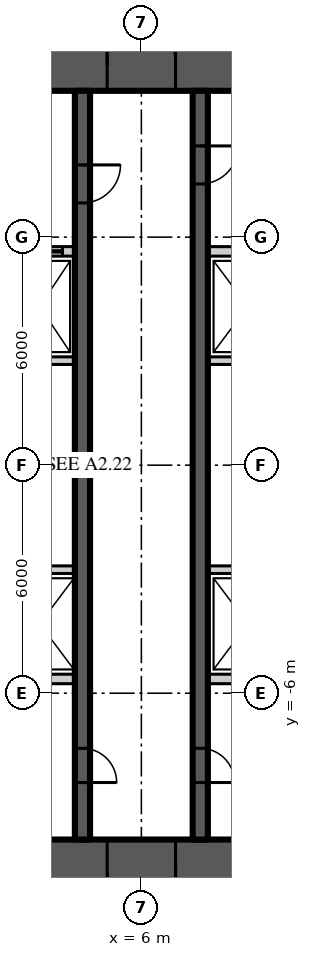
"""IFC4 building model, lengths in metres.
Left out: names, types, materials, properties, quantities, classifications, styles, units other than length and angle.
Written with IfcOpenShell. Run it as: python <this file> out.ifc"""

import sys

from ifc_helpers import new_model, si_unit, direction, frame, frame_2d, origin, place, context, subcontext, project, spatial, rectangle, extrude, element, fill, save


model = new_model("IFC4")
c1 = context("Model", 3, precision=1e-05, world=origin(), true_north=direction((0.0, 1.0)))
c2 = subcontext(c1, "Body", "Model", "MODEL_VIEW")
j1 = project(units=[si_unit("LENGTHUNIT", "METRE"), si_unit("PLANEANGLEUNIT", "RADIAN")], contexts=[c1])
p1 = place(None, origin())
s1 = spatial("IfcSite", under=j1, at=p1, CompositionType="ELEMENT")
p2 = place(p1, origin())
s2 = spatial("IfcBuilding", under=s1, at=p2, CompositionType="ELEMENT")
p3 = place(p2, frame((0.0, 0.0, 163.2)))
s3 = spatial("IfcBuildingStorey", under=s2, at=p3, CompositionType="ELEMENT", Elevation=163.2)
p4 = place(p3, frame((-11.15, 10.5, 0.0), z_axis=(0.0, 0.0, 1.0), x_axis=(1.0, 0.0, 0.0)))
e1 = element("IfcWall", 1, at=p4, inside=s3, PredefinedType="SHEAR", context=c2, shape_type="SweptSolid", body=[
    extrude(rectangle(XDim=22.3, YDim=1.3, at=frame_2d((11.15, 0.0))), origin(), (0.0, 0.0, 1.0), 3.9),
])
p5 = place(p4, frame((4.25, 0.0, 0.0)))
e2 = element("IfcOpeningElement", 2, at=p5, cuts=e1, PredefinedType="OPENING", context=c2, shape_type="SweptSolid", body=[
    extrude(rectangle(XDim=1.8, YDim=2.2, at=frame_2d((0.9, 1.1))), frame((0.0, 0.66, 0.0), z_axis=(0.0, -1.0, 0.0), x_axis=(1.0, 0.0, 0.0)), (0.0, 0.0, 1.0), 1.32),
])
p6 = place(p4, frame((16.25, 0.0, 0.0)))
e3 = element("IfcOpeningElement", 3, at=p6, cuts=e1, PredefinedType="OPENING", context=c2, shape_type="SweptSolid", body=[
    extrude(rectangle(XDim=1.8, YDim=2.2, at=frame_2d((0.9, 1.1))), frame((0.0, 0.66, 0.0), z_axis=(0.0, -1.0, 0.0), x_axis=(1.0, 0.0, 0.0)), (0.0, 0.0, 1.0), 1.32),
])
p7 = place(p3, frame((11.15, -10.5, 0.0), z_axis=(0.0, 0.0, 1.0), x_axis=(-1.0, 0.0, 0.0)))
e4 = element("IfcWall", 4, at=p7, inside=s3, PredefinedType="SHEAR", context=c2, shape_type="SweptSolid", body=[
    extrude(rectangle(XDim=22.3, YDim=1.3, at=frame_2d((11.15, 0.0))), origin(), (0.0, 0.0, 1.0), 3.9),
])
p8 = place(p7, frame((16.25, 0.0, 0.0)))
e5 = element("IfcOpeningElement", 5, at=p8, cuts=e4, PredefinedType="OPENING", context=c2, shape_type="SweptSolid", body=[
    extrude(rectangle(XDim=1.8, YDim=2.2, at=frame_2d((0.9, 1.1))), frame((0.0, 0.66, 0.0), z_axis=(0.0, -1.0, 0.0), x_axis=(1.0, 0.0, 0.0)), (0.0, 0.0, 1.0), 1.32),
])
p9 = place(p7, frame((4.25, 0.0, 0.0)))
e6 = element("IfcOpeningElement", 6, at=p9, cuts=e4, PredefinedType="OPENING", context=c2, shape_type="SweptSolid", body=[
    extrude(rectangle(XDim=1.8, YDim=2.2, at=frame_2d((0.9, 1.1))), frame((0.0, 0.66, 0.0), z_axis=(0.0, -1.0, 0.0), x_axis=(1.0, 0.0, 0.0)), (0.0, 0.0, 1.0), 1.32),
])
p10 = place(p3, frame((7.55, 9.85, 0.0), z_axis=(0.0, 0.0, 1.0), x_axis=(0.0, -1.0, 0.0)))
e7 = element("IfcWall", 7, at=p10, inside=s3, PredefinedType="SHEAR", context=c2, shape_type="SweptSolid", body=[
    extrude(rectangle(XDim=19.7, YDim=0.4, at=frame_2d((9.85, 0.0))), origin(), (0.0, 0.0, 1.0), 3.9),
])
p11 = place(p10, frame((1.45, 0.0, 0.0)))
e8 = element("IfcOpeningElement", 8, at=p11, cuts=e7, PredefinedType="OPENING", context=c2, shape_type="SweptSolid", body=[
    extrude(rectangle(XDim=1.0, YDim=2.2, at=frame_2d((0.5, 1.1))), frame((0.0, 0.21, 0.0), z_axis=(0.0, -1.0, 0.0), x_axis=(1.0, 0.0, 0.0)), (0.0, 0.0, 1.0), 0.42),
])
p12 = place(p10, frame((17.3, 0.0, 0.0)))
e9 = element("IfcOpeningElement", 9, at=p12, cuts=e7, PredefinedType="OPENING", context=c2, shape_type="SweptSolid", body=[
    extrude(rectangle(XDim=0.9, YDim=2.1, at=frame_2d((0.45, 1.05))), frame((0.0, 0.21, 0.0), z_axis=(0.0, -1.0, 0.0), x_axis=(1.0, 0.0, 0.0)), (0.0, 0.0, 1.0), 0.42),
])
p13 = place(p3, frame((4.45, 9.85, 0.0), z_axis=(0.0, 0.0, 1.0), x_axis=(0.0, -1.0, 0.0)))
e10 = element("IfcWall", 10, at=p13, inside=s3, PredefinedType="SHEAR", context=c2, shape_type="SweptSolid", body=[
    extrude(rectangle(XDim=19.7, YDim=0.4, at=frame_2d((9.85, 0.0))), origin(), (0.0, 0.0, 1.0), 3.9),
])
p14 = place(p13, frame((1.95, 0.0, 0.0)))
e11 = element("IfcOpeningElement", 11, at=p14, cuts=e10, PredefinedType="OPENING", context=c2, shape_type="SweptSolid", body=[
    extrude(rectangle(XDim=1.0, YDim=2.2, at=frame_2d((0.5, 1.1))), frame((0.0, 0.21, 0.0), z_axis=(0.0, -1.0, 0.0), x_axis=(1.0, 0.0, 0.0)), (0.0, 0.0, 1.0), 0.42),
])
p15 = place(p13, frame((17.3, 0.0, 0.0)))
e12 = element("IfcOpeningElement", 12, at=p15, cuts=e10, PredefinedType="OPENING", context=c2, shape_type="SweptSolid", body=[
    extrude(rectangle(XDim=0.9, YDim=2.1, at=frame_2d((0.45, 1.05))), frame((0.0, 0.21, 0.0), z_axis=(0.0, -1.0, 0.0), x_axis=(1.0, 0.0, 0.0)), (0.0, 0.0, 1.0), 0.42),
])
p16 = place(p3, frame((2.4, 5.625, 0.0), z_axis=(0.0, 0.0, 1.0), x_axis=(1.0, 0.0, 0.0)))
e13 = element("IfcWall", 13, at=p16, inside=s3, PredefinedType="SOLIDWALL", context=c2, shape_type="SweptSolid", body=[
    extrude(rectangle(XDim=1.85, YDim=0.25, at=frame_2d((0.925, 0.0))), origin(), (0.0, 0.0, 1.0), 3.7),
])
p17 = place(p16, frame((0.325, 0.0, 0.0)))
e14 = element("IfcOpeningElement", 14, at=p17, cuts=e13, PredefinedType="OPENING", context=c2, shape_type="SweptSolid", body=[
    extrude(rectangle(XDim=1.2, YDim=2.2, at=frame_2d((0.6, 1.1))), frame((0.0, 0.135, 0.0), z_axis=(0.0, -1.0, 0.0), x_axis=(1.0, 0.0, 0.0)), (0.0, 0.0, 1.0), 0.27),
])
p18 = place(p3, frame((7.75, 5.625, 0.0), z_axis=(0.0, 0.0, 1.0), x_axis=(1.0, 0.0, 0.0)))
e15 = element("IfcWall", 15, at=p18, inside=s3, PredefinedType="SOLIDWALL", context=c2, shape_type="SweptSolid", body=[
    extrude(rectangle(XDim=2.1, YDim=0.25, at=frame_2d((1.05, 0.0))), origin(), (0.0, 0.0, 1.0), 3.7),
])
p19 = place(p3, frame((2.4, -5.625, 0.0), z_axis=(0.0, 0.0, 1.0), x_axis=(1.0, 0.0, 0.0)))
e16 = element("IfcWall", 16, at=p19, inside=s3, PredefinedType="SOLIDWALL", context=c2, shape_type="SweptSolid", body=[
    extrude(rectangle(XDim=1.85, YDim=0.25, at=frame_2d((0.925, 0.0))), origin(), (0.0, 0.0, 1.0), 3.7),
])
p20 = place(p3, frame((7.75, -5.625, 0.0), z_axis=(0.0, 0.0, 1.0), x_axis=(1.0, 0.0, 0.0)))
e17 = element("IfcWall", 17, at=p20, inside=s3, PredefinedType="SOLIDWALL", context=c2, shape_type="SweptSolid", body=[
    extrude(rectangle(XDim=2.1, YDim=0.25, at=frame_2d((1.05, 0.0))), origin(), (0.0, 0.0, 1.0), 3.7),
])
p21 = place(p3, frame((2.4, -2.75, 0.0), z_axis=(0.0, 0.0, 1.0), x_axis=(1.0, 0.0, 0.0)))
e18 = element("IfcWall", 18, at=p21, inside=s3, PredefinedType="SOLIDWALL", context=c2, shape_type="SweptSolid", body=[
    extrude(rectangle(XDim=1.85, YDim=0.2, at=frame_2d((0.925, 0.0))), origin(), (0.0, 0.0, 1.0), 3.7),
])
p22 = place(p3, frame((7.75, -2.75, 0.0), z_axis=(0.0, 0.0, 1.0), x_axis=(1.0, 0.0, 0.0)))
e19 = element("IfcWall", 19, at=p22, inside=s3, PredefinedType="SOLIDWALL", context=c2, shape_type="SweptSolid", body=[
    extrude(rectangle(XDim=2.1, YDim=0.2, at=frame_2d((1.05, 0.0))), origin(), (0.0, 0.0, 1.0), 3.7),
])
p23 = place(p3, frame((2.4, 2.75, 0.0), z_axis=(0.0, 0.0, 1.0), x_axis=(1.0, 0.0, 0.0)))
e20 = element("IfcWall", 20, at=p23, inside=s3, PredefinedType="SOLIDWALL", context=c2, shape_type="SweptSolid", body=[
    extrude(rectangle(XDim=1.85, YDim=0.2, at=frame_2d((0.925, 0.0))), origin(), (0.0, 0.0, 1.0), 3.7),
])
p24 = place(p3, frame((7.75, 2.75, 0.0), z_axis=(0.0, 0.0, 1.0), x_axis=(1.0, 0.0, 0.0)))
e21 = element("IfcWall", 21, at=p24, inside=s3, PredefinedType="SOLIDWALL", context=c2, shape_type="SweptSolid", body=[
    extrude(rectangle(XDim=2.1, YDim=0.2, at=frame_2d((1.05, 0.0))), origin(), (0.0, 0.0, 1.0), 3.7),
])
p25 = place(p6, origin())
e22 = element("IfcDoor", 22, at=p25, inside=s3, OperationType="DOUBLE_DOOR_DOUBLE_SWING", PredefinedType="DOOR", context=c2, shape_type="SweptSolid", body=[
    extrude(rectangle(XDim=1.8, YDim=2.2, at=frame_2d((0.9, 1.1))), frame((0.0, 0.025, 0.0), z_axis=(0.0, -1.0, 0.0), x_axis=(1.0, 0.0, 0.0)), (0.0, 0.0, 1.0), 0.05),
])
fill(e3, e22)
p26 = place(p9, origin())
e23 = element("IfcDoor", 23, at=p26, inside=s3, OperationType="DOUBLE_DOOR_DOUBLE_SWING", PredefinedType="DOOR", context=c2, shape_type="SweptSolid", body=[
    extrude(rectangle(XDim=1.8, YDim=2.2, at=frame_2d((0.9, 1.1))), frame((0.0, 0.025, 0.0), z_axis=(0.0, -1.0, 0.0), x_axis=(1.0, 0.0, 0.0)), (0.0, 0.0, 1.0), 0.05),
])
fill(e6, e23)
p27 = place(p11, origin())
e24 = element("IfcDoor", 24, at=p27, inside=s3, OperationType="SINGLE_SWING_LEFT", PredefinedType="DOOR", context=c2, shape_type="SweptSolid", body=[
    extrude(rectangle(XDim=1.0, YDim=2.2, at=frame_2d((0.5, 1.1))), frame((0.0, 0.025, 0.0), z_axis=(0.0, -1.0, 0.0), x_axis=(1.0, 0.0, 0.0)), (0.0, 0.0, 1.0), 0.05),
])
fill(e8, e24)
p28 = place(p14, origin())
e25 = element("IfcDoor", 25, at=p28, inside=s3, OperationType="SINGLE_SWING_LEFT", PredefinedType="DOOR", context=c2, shape_type="SweptSolid", body=[
    extrude(rectangle(XDim=1.0, YDim=2.2, at=frame_2d((0.5, 1.1))), frame((0.0, 0.025, 0.0), z_axis=(0.0, -1.0, 0.0), x_axis=(1.0, 0.0, 0.0)), (0.0, 0.0, 1.0), 0.05),
])
fill(e11, e25)
p29 = place(p12, origin())
e26 = element("IfcDoor", 26, at=p29, inside=s3, OperationType="SINGLE_SWING_RIGHT", PredefinedType="DOOR", context=c2, shape_type="SweptSolid", body=[
    extrude(rectangle(XDim=0.9, YDim=2.1, at=frame_2d((0.45, 1.05))), frame((0.0, 0.025, 0.0), z_axis=(0.0, -1.0, 0.0), x_axis=(1.0, 0.0, 0.0)), (0.0, 0.0, 1.0), 0.05),
])
fill(e9, e26)
p30 = place(p15, origin())
e27 = element("IfcDoor", 27, at=p30, inside=s3, OperationType="SINGLE_SWING_RIGHT", PredefinedType="DOOR", context=c2, shape_type="SweptSolid", body=[
    extrude(rectangle(XDim=0.9, YDim=2.1, at=frame_2d((0.45, 1.05))), frame((0.0, 0.025, 0.0), z_axis=(0.0, -1.0, 0.0), x_axis=(1.0, 0.0, 0.0)), (0.0, 0.0, 1.0), 0.05),
])
fill(e12, e27)
p31 = place(p17, origin())
e28 = element("IfcDoor", 28, at=p31, inside=s3, OperationType="SLIDING_TO_LEFT", PredefinedType="DOOR", context=c2, shape_type="SweptSolid", body=[
    extrude(rectangle(XDim=1.2, YDim=2.2, at=frame_2d((0.6, 1.1))), frame((0.0, 0.025, 0.0), z_axis=(0.0, -1.0, 0.0), x_axis=(1.0, 0.0, 0.0)), (0.0, 0.0, 1.0), 0.05),
])
fill(e14, e28)
save(model, sys.argv[1])
